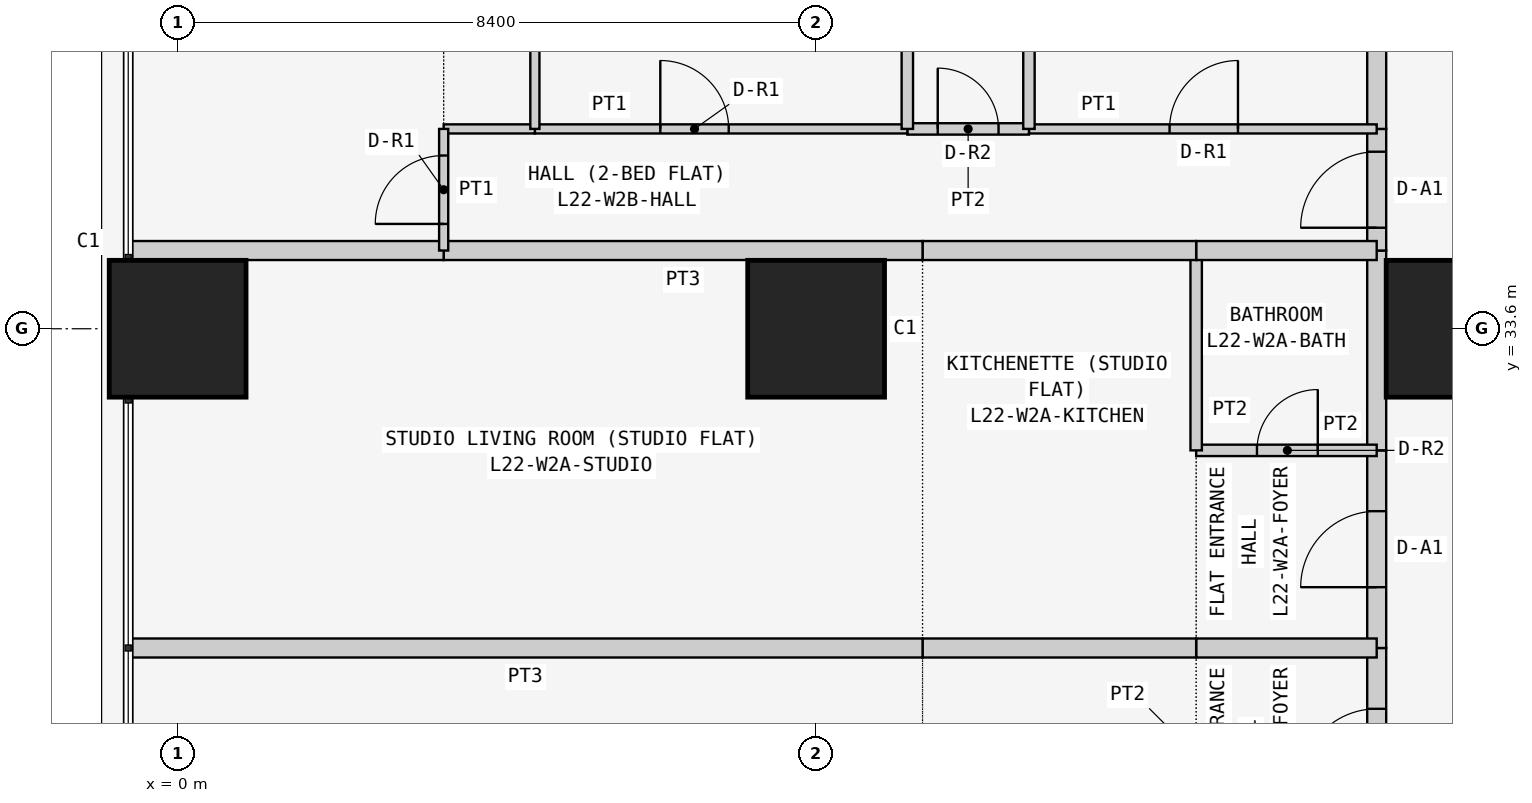
"""IFC4 building model, lengths in metres.
Left out: names, types, materials, properties, quantities, classifications, styles, units other than length and angle.
Written with IfcOpenShell. Run it as: python <this file> out.ifc"""

import sys

from ifc_helpers import new_model, si_unit, direction, frame, frame_2d, origin, origin_2d, place, context, subcontext, project, spatial, rectangle, extrude, element, fill, save


model = new_model("IFC4")
c1 = context("Model", 3, precision=1e-05, world=origin(), true_north=direction((0.0, 1.0)))
c2 = subcontext(c1, "Body", "Model", "MODEL_VIEW")
j1 = project(units=[si_unit("LENGTHUNIT", "METRE"), si_unit("PLANEANGLEUNIT", "RADIAN")], contexts=[c1])
p1 = place(None, origin())
s1 = spatial("IfcSite", under=j1, at=p1, CompositionType="ELEMENT")
p2 = place(p1, origin())
s2 = spatial("IfcBuilding", under=s1, at=p2, CompositionType="ELEMENT")
p3 = place(p2, frame((0.0, 0.0, 88.5)))
s3 = spatial("IfcBuildingStorey", under=s2, at=p3, CompositionType="ELEMENT", Elevation=88.5)
for number, where, z_axis, x_axis in (
    (1, (0.0, 33.6, 0.0), (0.0, 0.0, 1.0), (1.0, 0.0, 0.0)),
    (2, (8.4, 33.6, 0.0), (0.0, 0.0, 1.0), (1.0, 0.0, 0.0)),
    (3, (16.8, 33.6, 0.0), (0.0, 0.0, 1.0), (1.0, 0.0, 0.0)),
):
    element("IfcColumn", number, at=place(p3, frame(where, z_axis=z_axis, x_axis=x_axis)), inside=s3, PredefinedType="COLUMN", context=c2, shape_type="SweptSolid", body=[
        extrude(rectangle(XDim=1.8, YDim=1.8, at=origin_2d()), origin(), (0.0, 0.0, 1.0), 3.6),
    ])
p4 = place(p3, frame((15.775, 26.8, 0.0), z_axis=(0.0, 0.0, 1.0), x_axis=(0.0, 1.0, 0.0)))
e4 = element("IfcWall", 4, at=p4, inside=s3, PredefinedType="PARTITIONING", context=c2, shape_type="SweptSolid", body=[
    extrude(rectangle(XDim=2.6, YDim=0.25, at=frame_2d((1.3, 0.0))), origin(), (0.0, 0.0, 1.0), 3.45),
])
p5 = place(p4, frame((0.8, 0.0, 0.0)))
e5 = element("IfcOpeningElement", 5, at=p5, cuts=e4, PredefinedType="OPENING", context=c2, shape_type="SweptSolid", body=[
    extrude(rectangle(XDim=1.0, YDim=2.1, at=frame_2d((0.5, 1.05))), frame((0.0, 0.135, 0.0), z_axis=(0.0, -1.0, 0.0), x_axis=(1.0, 0.0, 0.0)), (0.0, 0.0, 1.0), 0.27),
])
p6 = place(p3, frame((15.775, 29.4, 0.0), z_axis=(0.0, 0.0, 1.0), x_axis=(0.0, 1.0, 0.0)))
e6 = element("IfcWall", 6, at=p6, inside=s3, PredefinedType="PARTITIONING", context=c2, shape_type="SweptSolid", body=[
    extrude(rectangle(XDim=2.6, YDim=0.25, at=frame_2d((1.3, 0.0))), origin(), (0.0, 0.0, 1.0), 3.45),
])
p7 = place(p6, frame((0.8, 0.0, 0.0)))
e7 = element("IfcOpeningElement", 7, at=p7, cuts=e6, PredefinedType="OPENING", context=c2, shape_type="SweptSolid", body=[
    extrude(rectangle(XDim=1.0, YDim=2.1, at=frame_2d((0.5, 1.05))), frame((0.0, 0.135, 0.0), z_axis=(0.0, -1.0, 0.0), x_axis=(1.0, 0.0, 0.0)), (0.0, 0.0, 1.0), 0.27),
])
p8 = place(p3, frame((15.775, 32.0, 0.0), z_axis=(0.0, 0.0, 1.0), x_axis=(0.0, 1.0, 0.0)))
e8 = element("IfcWall", 8, at=p8, inside=s3, PredefinedType="PARTITIONING", context=c2, shape_type="SweptSolid", body=[
    extrude(rectangle(XDim=2.629, YDim=0.25, at=frame_2d((1.314, 0.0))), origin(), (0.0, 0.0, 1.0), 3.45),
])
p9 = place(p3, frame((15.775, 34.629, 0.0), z_axis=(0.0, 0.0, 1.0), x_axis=(0.0, 1.0, 0.0)))
e9 = element("IfcWall", 9, at=p9, inside=s3, PredefinedType="PARTITIONING", context=c2, shape_type="SweptSolid", body=[
    extrude(rectangle(XDim=1.6, YDim=0.25, at=frame_2d((0.8, 0.0))), origin(), (0.0, 0.0, 1.0), 3.45),
])
p10 = place(p9, frame((0.3, 0.0, 0.0)))
e10 = element("IfcOpeningElement", 10, at=p10, cuts=e9, PredefinedType="OPENING", context=c2, shape_type="SweptSolid", body=[
    extrude(rectangle(XDim=1.0, YDim=2.1, at=frame_2d((0.5, 1.05))), frame((0.0, 0.135, 0.0), z_axis=(0.0, -1.0, 0.0), x_axis=(1.0, 0.0, 0.0)), (0.0, 0.0, 1.0), 0.27),
])
p11 = place(p3, frame((15.775, 36.229, 0.0), z_axis=(0.0, 0.0, 1.0), x_axis=(0.0, 1.0, 0.0)))
e11 = element("IfcWall", 11, at=p11, inside=s3, PredefinedType="PARTITIONING", context=c2, shape_type="SweptSolid", body=[
    extrude(rectangle(XDim=6.471, YDim=0.25, at=frame_2d((3.235, 0.0))), origin(), (0.0, 0.0, 1.0), 3.45),
])
p12 = place(p3, frame((15.775, 29.4, 0.0), z_axis=(0.0, 0.0, 1.0), x_axis=(-1.0, 0.0, 0.0)))
e12 = element("IfcWall", 12, at=p12, inside=s3, PredefinedType="PARTITIONING", context=c2, shape_type="SweptSolid", body=[
    extrude(rectangle(XDim=2.375, YDim=0.25, at=frame_2d((1.188, 0.0))), origin(), (0.0, 0.0, 1.0), 3.45),
])
p13 = place(p3, frame((13.4, 29.4, 0.0), z_axis=(0.0, 0.0, 1.0), x_axis=(-1.0, 0.0, 0.0)))
e13 = element("IfcWall", 13, at=p13, inside=s3, PredefinedType="PARTITIONING", context=c2, shape_type="SweptSolid", body=[
    extrude(rectangle(XDim=3.6, YDim=0.25, at=frame_2d((1.8, 0.0))), origin(), (0.0, 0.0, 1.0), 3.45),
])
p14 = place(p3, frame((9.8, 29.4, 0.0), z_axis=(0.0, 0.0, 1.0), x_axis=(-1.0, 0.0, 0.0)))
e14 = element("IfcWall", 14, at=p14, inside=s3, PredefinedType="PARTITIONING", context=c2, shape_type="SweptSolid", body=[
    extrude(rectangle(XDim=10.45, YDim=0.25, at=frame_2d((5.225, 0.0))), origin(), (0.0, 0.0, 1.0), 3.45),
])
p15 = place(p3, frame((13.4, 32.0, 0.0), z_axis=(0.0, 0.0, 1.0), x_axis=(1.0, 0.0, 0.0)))
e15 = element("IfcWall", 15, at=p15, inside=s3, PredefinedType="PARTITIONING", context=c2, shape_type="SweptSolid", body=[
    extrude(rectangle(XDim=2.375, YDim=0.15, at=frame_2d((1.188, 0.0))), origin(), (0.0, 0.0, 1.0), 3.45),
])
p16 = place(p15, frame((0.8, 0.0, 0.0)))
e16 = element("IfcOpeningElement", 16, at=p16, cuts=e15, PredefinedType="OPENING", context=c2, shape_type="SweptSolid", body=[
    extrude(rectangle(XDim=0.8, YDim=2.1, at=frame_2d((0.4, 1.05))), frame((0.0, 0.085, 0.0), z_axis=(0.0, -1.0, 0.0), x_axis=(1.0, 0.0, 0.0)), (0.0, 0.0, 1.0), 0.17),
])
p17 = place(p3, frame((13.4, 32.0, 0.0), z_axis=(0.0, 0.0, 1.0), x_axis=(0.0, 1.0, 0.0)))
e17 = element("IfcWall", 17, at=p17, inside=s3, PredefinedType="PARTITIONING", context=c2, shape_type="SweptSolid", body=[
    extrude(rectangle(XDim=2.629, YDim=0.15, at=frame_2d((1.314, 0.0))), origin(), (0.0, 0.0, 1.0), 3.45),
])
p18 = place(p3, frame((13.4, 34.629, 0.0), z_axis=(0.0, 0.0, 1.0), x_axis=(1.0, 0.0, 0.0)))
e18 = element("IfcWall", 18, at=p18, inside=s3, PredefinedType="PARTITIONING", context=c2, shape_type="SweptSolid", body=[
    extrude(rectangle(XDim=2.375, YDim=0.25, at=frame_2d((1.188, 0.0))), origin(), (0.0, 0.0, 1.0), 3.45),
])
p19 = place(p3, frame((9.8, 34.629, 0.0), z_axis=(0.0, 0.0, 1.0), x_axis=(1.0, 0.0, 0.0)))
e19 = element("IfcWall", 19, at=p19, inside=s3, PredefinedType="PARTITIONING", context=c2, shape_type="SweptSolid", body=[
    extrude(rectangle(XDim=3.6, YDim=0.25, at=frame_2d((1.8, 0.0))), origin(), (0.0, 0.0, 1.0), 3.45),
])
p20 = place(p3, frame((3.5, 34.629, 0.0), z_axis=(0.0, 0.0, 1.0), x_axis=(1.0, 0.0, 0.0)))
e20 = element("IfcWall", 20, at=p20, inside=s3, PredefinedType="PARTITIONING", context=c2, shape_type="SweptSolid", body=[
    extrude(rectangle(XDim=6.3, YDim=0.25, at=frame_2d((3.15, 0.0))), origin(), (0.0, 0.0, 1.0), 3.45),
])
p21 = place(p3, frame((-0.65, 34.629, 0.0), z_axis=(0.0, 0.0, 1.0), x_axis=(1.0, 0.0, 0.0)))
e21 = element("IfcWall", 21, at=p21, inside=s3, PredefinedType="PARTITIONING", context=c2, shape_type="SweptSolid", body=[
    extrude(rectangle(XDim=4.15, YDim=0.25, at=frame_2d((2.075, 0.0))), origin(), (0.0, 0.0, 1.0), 3.45),
])
p22 = place(p3, frame((11.2, 36.229, 0.0), z_axis=(0.0, 0.0, 1.0), x_axis=(1.0, 0.0, 0.0)))
e22 = element("IfcWall", 22, at=p22, inside=s3, PredefinedType="PARTITIONING", context=c2, shape_type="SweptSolid", body=[
    extrude(rectangle(XDim=4.575, YDim=0.12, at=frame_2d((2.288, 0.0))), origin(), (0.0, 0.0, 1.0), 3.45),
])
p23 = place(p22, frame((1.85, 0.0, 0.0)))
e23 = element("IfcOpeningElement", 23, at=p23, cuts=e22, PredefinedType="OPENING", context=c2, shape_type="SweptSolid", body=[
    extrude(rectangle(XDim=0.9, YDim=2.1, at=frame_2d((0.45, 1.05))), frame((0.0, 0.07, 0.0), z_axis=(0.0, -1.0, 0.0), x_axis=(1.0, 0.0, 0.0)), (0.0, 0.0, 1.0), 0.14),
])
p24 = place(p3, frame((9.6, 36.229, 0.0), z_axis=(0.0, 0.0, 1.0), x_axis=(1.0, 0.0, 0.0)))
e24 = element("IfcWall", 24, at=p24, inside=s3, PredefinedType="PARTITIONING", context=c2, shape_type="SweptSolid", body=[
    extrude(rectangle(XDim=1.6, YDim=0.15, at=frame_2d((0.8, 0.0))), origin(), (0.0, 0.0, 1.0), 3.45),
])
p25 = place(p24, frame((0.4, 0.0, 0.0)))
e25 = element("IfcOpeningElement", 25, at=p25, cuts=e24, PredefinedType="OPENING", context=c2, shape_type="SweptSolid", body=[
    extrude(rectangle(XDim=0.8, YDim=2.1, at=frame_2d((0.4, 1.05))), frame((0.0, 0.085, 0.0), z_axis=(0.0, -1.0, 0.0), x_axis=(1.0, 0.0, 0.0)), (0.0, 0.0, 1.0), 0.17),
])
p26 = place(p3, frame((4.7, 36.229, 0.0), z_axis=(0.0, 0.0, 1.0), x_axis=(1.0, 0.0, 0.0)))
e26 = element("IfcWall", 26, at=p26, inside=s3, PredefinedType="PARTITIONING", context=c2, shape_type="SweptSolid", body=[
    extrude(rectangle(XDim=4.9, YDim=0.12, at=frame_2d((2.45, 0.0))), origin(), (0.0, 0.0, 1.0), 3.45),
])
p27 = place(p26, frame((1.65, 0.0, 0.0)))
e27 = element("IfcOpeningElement", 27, at=p27, cuts=e26, PredefinedType="OPENING", context=c2, shape_type="SweptSolid", body=[
    extrude(rectangle(XDim=0.9, YDim=2.1, at=frame_2d((0.45, 1.05))), frame((0.0, 0.07, 0.0), z_axis=(0.0, -1.0, 0.0), x_axis=(1.0, 0.0, 0.0)), (0.0, 0.0, 1.0), 0.14),
])
p28 = place(p3, frame((3.5, 36.229, 0.0), z_axis=(0.0, 0.0, 1.0), x_axis=(1.0, 0.0, 0.0)))
e28 = element("IfcWall", 28, at=p28, inside=s3, PredefinedType="PARTITIONING", context=c2, shape_type="SweptSolid", body=[
    extrude(rectangle(XDim=1.2, YDim=0.12, at=frame_2d((0.6, 0.0))), origin(), (0.0, 0.0, 1.0), 3.45),
])
p29 = place(p3, frame((3.5, 34.629, 0.0), z_axis=(0.0, 0.0, 1.0), x_axis=(0.0, 1.0, 0.0)))
e29 = element("IfcWall", 29, at=p29, inside=s3, PredefinedType="PARTITIONING", context=c2, shape_type="SweptSolid", body=[
    extrude(rectangle(XDim=1.6, YDim=0.12, at=frame_2d((0.8, 0.0))), origin(), (0.0, 0.0, 1.0), 3.45),
])
p30 = place(p29, frame((0.35, 0.0, 0.0)))
e30 = element("IfcOpeningElement", 30, at=p30, cuts=e29, PredefinedType="OPENING", context=c2, shape_type="SweptSolid", body=[
    extrude(rectangle(XDim=0.9, YDim=2.1, at=frame_2d((0.45, 1.05))), frame((0.0, 0.07, 0.0), z_axis=(0.0, -1.0, 0.0), x_axis=(1.0, 0.0, 0.0)), (0.0, 0.0, 1.0), 0.14),
])
for number, where, z_axis, x_axis in (
    (31, (11.2, 36.229, 0.0), (0.0, 0.0, 1.0), (0.0, 1.0, 0.0)),
    (32, (9.6, 36.229, 0.0), (0.0, 0.0, 1.0), (0.0, 1.0, 0.0)),
):
    element("IfcWall", number, at=place(p3, frame(where, z_axis=z_axis, x_axis=x_axis)), inside=s3, PredefinedType="PARTITIONING", context=c2, shape_type="SweptSolid", body=[
        extrude(rectangle(XDim=6.471, YDim=0.15, at=frame_2d((3.235, 0.0))), origin(), (0.0, 0.0, 1.0), 3.45),
    ])
p31 = place(p3, frame((4.7, 36.229, 0.0), z_axis=(0.0, 0.0, 1.0), x_axis=(0.0, 1.0, 0.0)))
e33 = element("IfcWall", 33, at=p31, inside=s3, PredefinedType="PARTITIONING", context=c2, shape_type="SweptSolid", body=[
    extrude(rectangle(XDim=6.471, YDim=0.12, at=frame_2d((3.235, 0.0))), origin(), (0.0, 0.0, 1.0), 3.45),
])
p32 = place(p5, origin())
e34 = element("IfcDoor", 34, at=p32, inside=s3, OperationType="SINGLE_SWING_LEFT", PredefinedType="DOOR", context=c2, shape_type="SweptSolid", body=[
    extrude(rectangle(XDim=1.0, YDim=2.1, at=frame_2d((0.5, 1.05))), frame((0.0, 0.025, 0.0), z_axis=(0.0, -1.0, 0.0), x_axis=(1.0, 0.0, 0.0)), (0.0, 0.0, 1.0), 0.05),
])
fill(e5, e34)
p33 = place(p7, origin())
e35 = element("IfcDoor", 35, at=p33, inside=s3, OperationType="SINGLE_SWING_LEFT", PredefinedType="DOOR", context=c2, shape_type="SweptSolid", body=[
    extrude(rectangle(XDim=1.0, YDim=2.1, at=frame_2d((0.5, 1.05))), frame((0.0, 0.025, 0.0), z_axis=(0.0, -1.0, 0.0), x_axis=(1.0, 0.0, 0.0)), (0.0, 0.0, 1.0), 0.05),
])
fill(e7, e35)
p34 = place(p16, origin())
e36 = element("IfcDoor", 36, at=p34, inside=s3, OperationType="SINGLE_SWING_RIGHT", PredefinedType="DOOR", context=c2, shape_type="SweptSolid", body=[
    extrude(rectangle(XDim=0.8, YDim=2.1, at=frame_2d((0.4, 1.05))), frame((0.0, 0.025, 0.0), z_axis=(0.0, -1.0, 0.0), x_axis=(1.0, 0.0, 0.0)), (0.0, 0.0, 1.0), 0.05),
])
fill(e16, e36)
p35 = place(p10, origin())
e37 = element("IfcDoor", 37, at=p35, inside=s3, OperationType="SINGLE_SWING_LEFT", PredefinedType="DOOR", context=c2, shape_type="SweptSolid", body=[
    extrude(rectangle(XDim=1.0, YDim=2.1, at=frame_2d((0.5, 1.05))), frame((0.0, 0.025, 0.0), z_axis=(0.0, -1.0, 0.0), x_axis=(1.0, 0.0, 0.0)), (0.0, 0.0, 1.0), 0.05),
])
fill(e10, e37)
p36 = place(p23, origin())
e38 = element("IfcDoor", 38, at=p36, inside=s3, OperationType="SINGLE_SWING_RIGHT", PredefinedType="DOOR", context=c2, shape_type="SweptSolid", body=[
    extrude(rectangle(XDim=0.9, YDim=2.1, at=frame_2d((0.45, 1.05))), frame((0.0, 0.025, 0.0), z_axis=(0.0, -1.0, 0.0), x_axis=(1.0, 0.0, 0.0)), (0.0, 0.0, 1.0), 0.05),
])
fill(e23, e38)
p37 = place(p25, origin())
e39 = element("IfcDoor", 39, at=p37, inside=s3, OperationType="SINGLE_SWING_LEFT", PredefinedType="DOOR", context=c2, shape_type="SweptSolid", body=[
    extrude(rectangle(XDim=0.8, YDim=2.1, at=frame_2d((0.4, 1.05))), frame((0.0, 0.025, 0.0), z_axis=(0.0, -1.0, 0.0), x_axis=(1.0, 0.0, 0.0)), (0.0, 0.0, 1.0), 0.05),
])
fill(e25, e39)
p38 = place(p27, origin())
e40 = element("IfcDoor", 40, at=p38, inside=s3, OperationType="SINGLE_SWING_LEFT", PredefinedType="DOOR", context=c2, shape_type="SweptSolid", body=[
    extrude(rectangle(XDim=0.9, YDim=2.1, at=frame_2d((0.45, 1.05))), frame((0.0, 0.025, 0.0), z_axis=(0.0, -1.0, 0.0), x_axis=(1.0, 0.0, 0.0)), (0.0, 0.0, 1.0), 0.05),
])
fill(e27, e40)
p39 = place(p30, origin())
e41 = element("IfcDoor", 41, at=p39, inside=s3, OperationType="SINGLE_SWING_LEFT", PredefinedType="DOOR", context=c2, shape_type="SweptSolid", body=[
    extrude(rectangle(XDim=0.9, YDim=2.1, at=frame_2d((0.45, 1.05))), frame((0.0, 0.025, 0.0), z_axis=(0.0, -1.0, 0.0), x_axis=(1.0, 0.0, 0.0)), (0.0, 0.0, 1.0), 0.05),
])
fill(e30, e41)
save(model, sys.argv[1])
